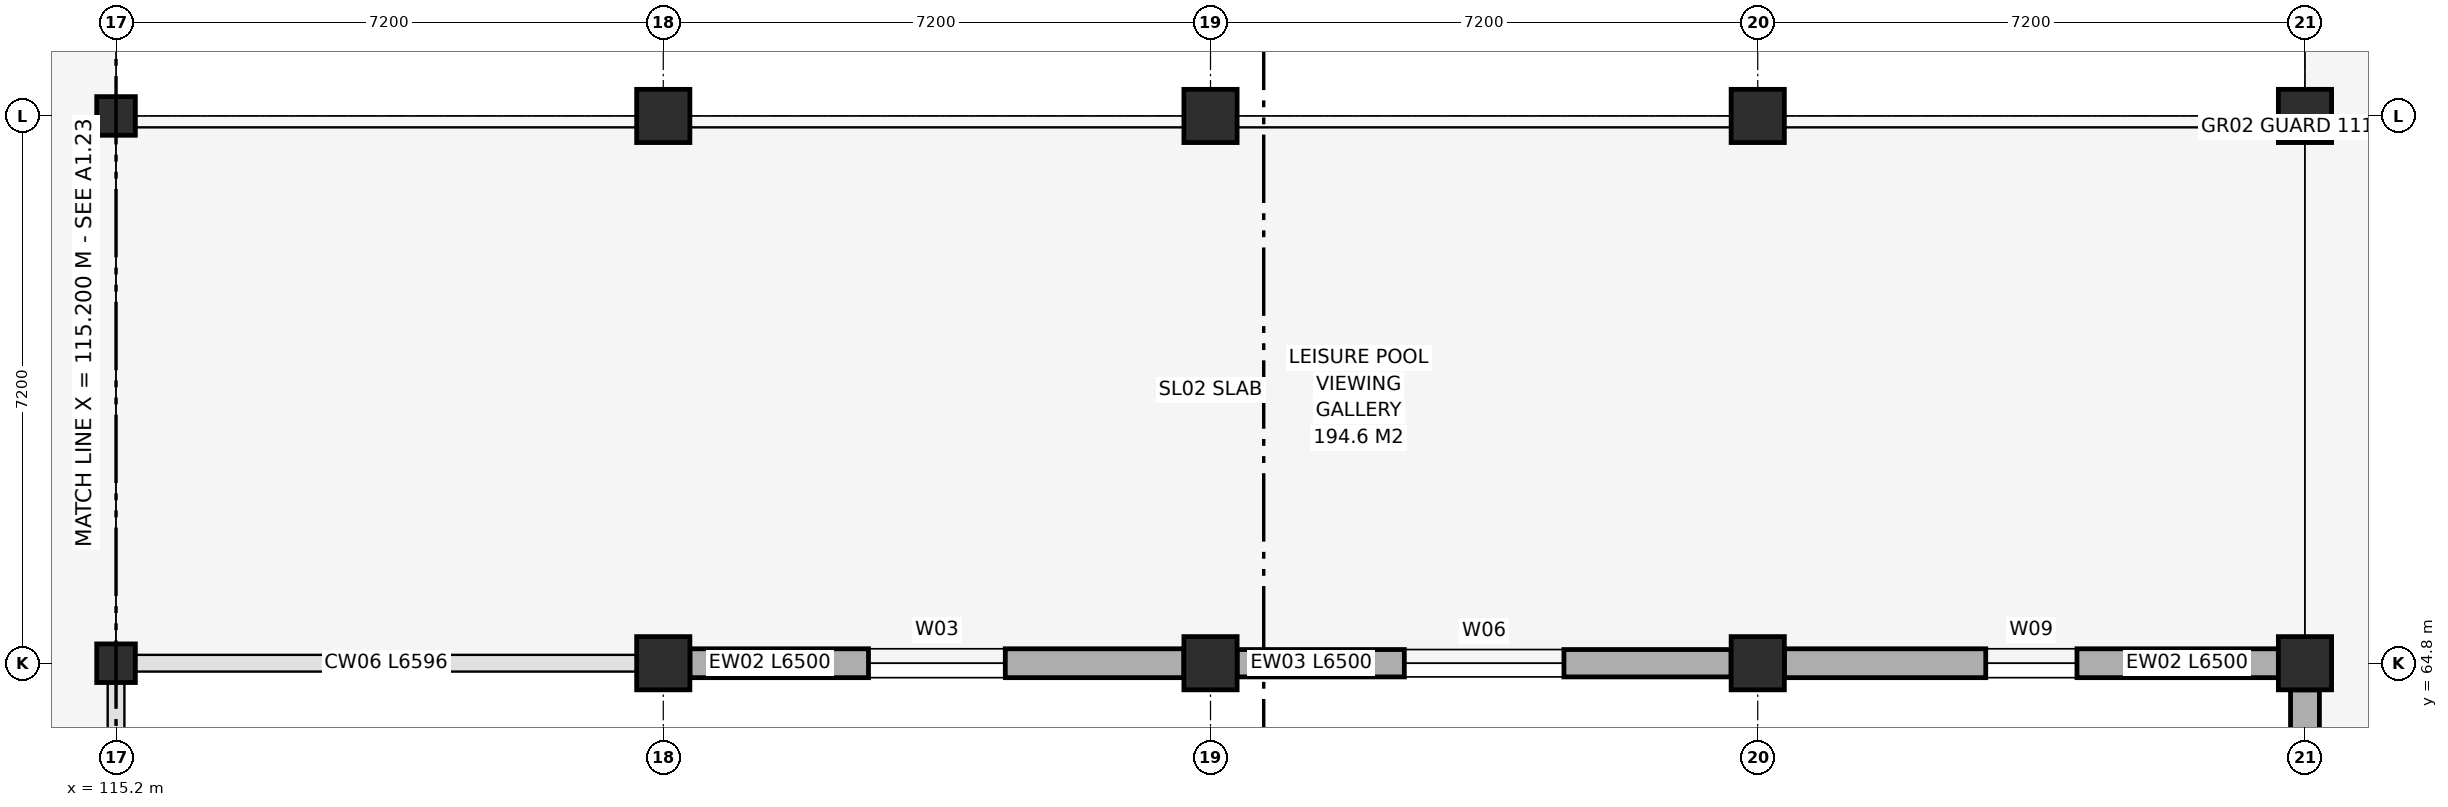
"""IFC4 building model, lengths in metres.
Left out: names, types, materials, properties, quantities, classifications, styles, units other than length and angle.
Written with IfcOpenShell. Run it as: python <this file> out.ifc"""

import sys

from ifc_helpers import new_model, si_unit, direction, frame, frame_2d, origin, origin_2d, place, context, subcontext, project, spatial, rectangle, hollow_circle, extrude, element, fill, save


model = new_model("IFC4")
c1 = context("Model", 3, precision=1e-05, world=origin(), true_north=direction((0.0, 1.0)))
c2 = subcontext(c1, "Body", "Model", "MODEL_VIEW")
j1 = project(units=[si_unit("LENGTHUNIT", "METRE"), si_unit("PLANEANGLEUNIT", "RADIAN")], contexts=[c1])
p1 = place(None, origin())
s1 = spatial("IfcSite", under=j1, at=p1, CompositionType="ELEMENT")
p2 = place(p1, origin())
s2 = spatial("IfcBuilding", under=s1, at=p2, CompositionType="ELEMENT")
p3 = place(p2, frame((0.0, 0.0, 5.4)))
s3 = spatial("IfcBuildingStorey", under=s2, at=p3, CompositionType="ELEMENT", Elevation=5.4)
for number, where, z_axis, x_axis in (
    (1, (115.2, 64.8, 0.0), (0.0, 0.0, 1.0), (1.0, 0.0, 0.0)),
    (2, (115.2, 72.0, 0.0), (0.0, 0.0, 1.0), (1.0, 0.0, 0.0)),
):
    element("IfcColumn", number, at=place(p3, frame(where, z_axis=z_axis, x_axis=x_axis)), inside=s3, PredefinedType="COLUMN", context=c2, shape_type="SweptSolid", body=[
        extrude(hollow_circle(Radius=0.254, WallThickness=0.022, at=origin_2d()), origin(), (0.0, 0.0, 1.0), 4.8),
    ])
for number, where, z_axis, x_axis in (
    (3, (122.4, 64.8, 0.0), (0.0, 0.0, 1.0), (1.0, 0.0, 0.0)),
    (4, (122.4, 72.0, 0.0), (0.0, 0.0, 1.0), (1.0, 0.0, 0.0)),
    (5, (129.6, 64.8, 0.0), (0.0, 0.0, 1.0), (1.0, 0.0, 0.0)),
    (6, (129.6, 72.0, 0.0), (0.0, 0.0, 1.0), (1.0, 0.0, 0.0)),
    (7, (136.8, 64.8, 0.0), (0.0, 0.0, 1.0), (1.0, 0.0, 0.0)),
    (8, (136.8, 72.0, 0.0), (0.0, 0.0, 1.0), (1.0, 0.0, 0.0)),
    (9, (144.0, 64.8, 0.0), (0.0, 0.0, 1.0), (1.0, 0.0, 0.0)),
    (10, (144.0, 72.0, 0.0), (0.0, 0.0, 1.0), (1.0, 0.0, 0.0)),
):
    element("IfcColumn", number, at=place(p3, frame(where, z_axis=z_axis, x_axis=x_axis)), inside=s3, PredefinedType="COLUMN", context=c2, shape_type="SweptSolid", body=[
        extrude(rectangle(XDim=0.7, YDim=0.7, at=origin_2d()), origin(), (0.0, 0.0, 1.0), 4.8),
    ])
p4 = place(p3, frame((122.75, 64.8, 0.0), z_axis=(0.0, 0.0, 1.0), x_axis=(1.0, 0.0, 0.0)))
e11 = element("IfcWall", 11, at=p4, inside=s3, PredefinedType="SOLIDWALL", context=c2, shape_type="SweptSolid", body=[
    extrude(rectangle(XDim=6.5, YDim=0.38, at=frame_2d((3.25, 0.0))), origin(), (0.0, 0.0, 1.0), 4.54),
])
p5 = place(p4, frame((2.35, 0.0, 0.95)))
e12 = element("IfcOpeningElement", 12, at=p5, cuts=e11, PredefinedType="OPENING", context=c2, shape_type="SweptSolid", body=[
    extrude(rectangle(XDim=1.8, YDim=2.2, at=frame_2d((0.9, 1.1))), frame((0.0, 0.205, 0.0), z_axis=(0.0, -1.0, 0.0), x_axis=(1.0, 0.0, 0.0)), (0.0, 0.0, 1.0), 0.41),
])
p6 = place(p3, frame((129.95, 64.8, 0.0), z_axis=(0.0, 0.0, 1.0), x_axis=(1.0, 0.0, 0.0)))
e13 = element("IfcWall", 13, at=p6, inside=s3, PredefinedType="SOLIDWALL", context=c2, shape_type="SweptSolid", body=[
    extrude(rectangle(XDim=6.5, YDim=0.36, at=frame_2d((3.25, 0.0))), origin(), (0.0, 0.0, 1.0), 4.54),
])
p7 = place(p6, frame((2.2, 0.0, 0.95)))
e14 = element("IfcOpeningElement", 14, at=p7, cuts=e13, PredefinedType="OPENING", context=c2, shape_type="SweptSolid", body=[
    extrude(rectangle(XDim=2.1, YDim=2.0, at=frame_2d((1.05, 1.0))), frame((0.0, 0.195, 0.0), z_axis=(0.0, -1.0, 0.0), x_axis=(1.0, 0.0, 0.0)), (0.0, 0.0, 1.0), 0.39),
])
p8 = place(p3, frame((137.15, 64.8, 0.0), z_axis=(0.0, 0.0, 1.0), x_axis=(1.0, 0.0, 0.0)))
e15 = element("IfcWall", 15, at=p8, inside=s3, PredefinedType="SOLIDWALL", context=c2, shape_type="SweptSolid", body=[
    extrude(rectangle(XDim=6.5, YDim=0.38, at=frame_2d((3.25, 0.0))), origin(), (0.0, 0.0, 1.0), 4.052),
])
p9 = place(p8, frame((2.65, 0.0, 0.95)))
e16 = element("IfcOpeningElement", 16, at=p9, cuts=e15, PredefinedType="OPENING", context=c2, shape_type="SweptSolid", body=[
    extrude(rectangle(XDim=1.2, YDim=2.0, at=frame_2d((0.6, 1.0))), frame((0.0, 0.205, 0.0), z_axis=(0.0, -1.0, 0.0), x_axis=(1.0, 0.0, 0.0)), (0.0, 0.0, 1.0), 0.41),
])
p10 = place(p3, frame((144.0, 57.95, 0.0), z_axis=(0.0, 0.0, 1.0), x_axis=(0.0, 1.0, 0.0)))
e17 = element("IfcWall", 17, at=p10, inside=s3, PredefinedType="SOLIDWALL", context=c2, shape_type="SweptSolid", body=[
    extrude(rectangle(XDim=6.5, YDim=0.38, at=frame_2d((3.25, 0.0))), origin(), (0.0, 0.0, 1.0), 3.952),
])
p11 = place(p10, frame((2.35, 0.0, 0.95)))
e18 = element("IfcOpeningElement", 18, at=p11, cuts=e17, PredefinedType="OPENING", context=c2, shape_type="SweptSolid", body=[
    extrude(rectangle(XDim=1.8, YDim=2.0, at=frame_2d((0.9, 1.0))), frame((0.0, 0.205, 0.0), z_axis=(0.0, -1.0, 0.0), x_axis=(1.0, 0.0, 0.0)), (0.0, 0.0, 1.0), 0.41),
])
p12 = place(p5, origin())
e19 = element("IfcWindow", 19, at=p12, inside=s3, PartitioningType="SINGLE_PANEL", PredefinedType="WINDOW", context=c2, shape_type="SweptSolid", body=[
    extrude(rectangle(XDim=1.8, YDim=2.2, at=frame_2d((0.9, 1.1))), frame((0.0, 0.03, 0.0), z_axis=(0.0, -1.0, 0.0), x_axis=(1.0, 0.0, 0.0)), (0.0, 0.0, 1.0), 0.06),
])
fill(e12, e19)
p13 = place(p7, origin())
e20 = element("IfcWindow", 20, at=p13, inside=s3, PartitioningType="SINGLE_PANEL", PredefinedType="WINDOW", context=c2, shape_type="SweptSolid", body=[
    extrude(rectangle(XDim=2.1, YDim=2.0, at=frame_2d((1.05, 1.0))), frame((0.0, 0.03, 0.0), z_axis=(0.0, -1.0, 0.0), x_axis=(1.0, 0.0, 0.0)), (0.0, 0.0, 1.0), 0.06),
])
fill(e14, e20)
p14 = place(p9, origin())
e21 = element("IfcWindow", 21, at=p14, inside=s3, PartitioningType="SINGLE_PANEL", PredefinedType="WINDOW", context=c2, shape_type="SweptSolid", body=[
    extrude(rectangle(XDim=1.2, YDim=2.0, at=frame_2d((0.6, 1.0))), frame((0.0, 0.03, 0.0), z_axis=(0.0, -1.0, 0.0), x_axis=(1.0, 0.0, 0.0)), (0.0, 0.0, 1.0), 0.06),
])
fill(e16, e21)
save(model, sys.argv[1])
